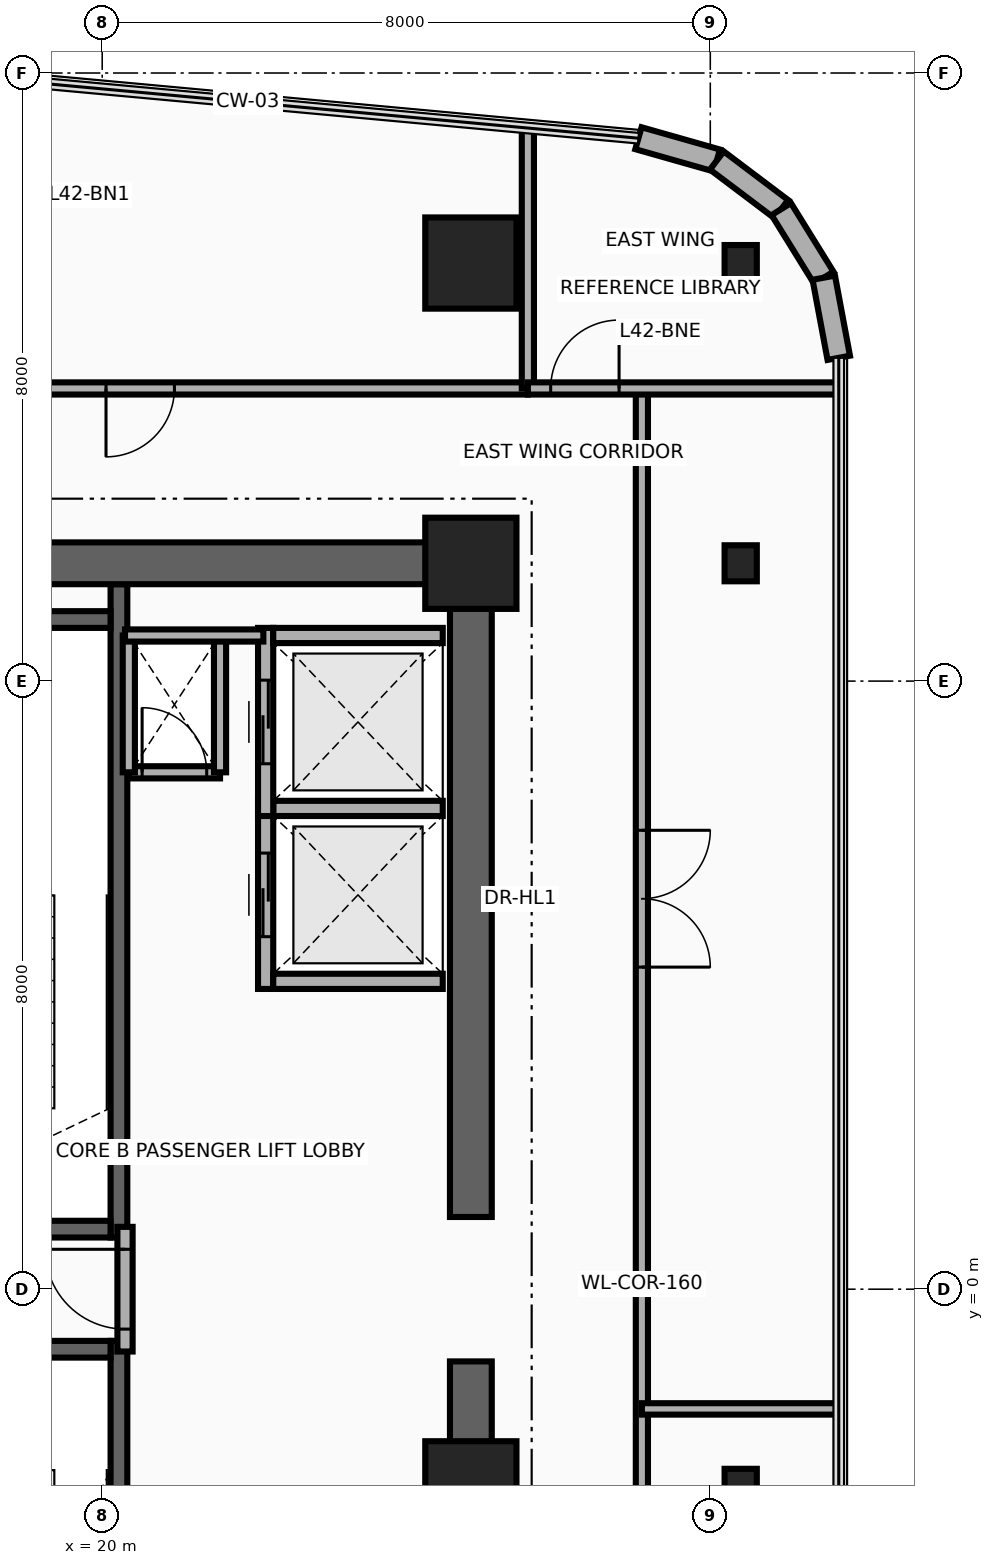
"""IFC4 building model, lengths in metres.
Left out: names, types, materials, properties, quantities, classifications, styles, units other than length and angle.
Written with IfcOpenShell. Run it as: python <this file> out.ifc"""

import sys

from ifc_helpers import new_model, si_unit, direction, frame, frame_2d, origin, origin_2d, place, context, subcontext, project, spatial, rectangle, i_section, extrude, source, transform, mapped, element, fill, save


model = new_model("IFC4")
c1 = context("Model", 3, precision=1e-05, world=origin(), true_north=direction((0.0, 1.0)))
c2 = subcontext(c1, "Body", "Model", "MODEL_VIEW")
j1 = project(units=[si_unit("LENGTHUNIT", "METRE"), si_unit("PLANEANGLEUNIT", "RADIAN")], contexts=[c1])
p1 = place(None, origin())
s1 = spatial("IfcSite", under=j1, at=p1, CompositionType="ELEMENT")
p2 = place(p1, origin())
s2 = spatial("IfcBuilding", under=s1, at=p2, CompositionType="ELEMENT")
p3 = place(p2, frame((0.0, 0.0, 164.9)))
s3 = spatial("IfcBuildingStorey", under=s2, at=p3, CompositionType="ELEMENT", Elevation=164.9)
p4 = place(p3, frame((20.22, 0.68, 0.0), z_axis=(0.0, 0.0, 1.0), x_axis=(0.0, 1.0, 0.0)))
e1 = element("IfcWall", 1, at=p4, inside=s3, PredefinedType="SHEAR", context=c2, shape_type="SweptSolid", body=[
    extrude(rectangle(XDim=8.595, YDim=0.22, at=frame_2d((4.297, 0.0))), origin(), (0.0, 0.0, 1.0), 3.46),
])
p5 = place(p3, frame((17.0, 0.79, 0.0), z_axis=(0.0, 0.0, 1.0), x_axis=(1.0, 0.0, 0.0)))
e2 = element("IfcWall", 2, at=p5, inside=s3, PredefinedType="SHEAR", context=c2, shape_type="SweptSolid", body=[
    extrude(rectangle(XDim=3.11, YDim=0.22, at=frame_2d((1.555, 0.0))), origin(), (0.0, 0.0, 1.0), 3.46),
])
p6 = place(p5, frame((0.95, 0.0, 0.0)))
e3 = element("IfcOpeningElement", 3, at=p6, cuts=e2, PredefinedType="OPENING", context=c2, shape_type="SweptSolid", body=[
    extrude(rectangle(XDim=1.1, YDim=2.15, at=frame_2d((0.55, 1.075))), frame((0.0, 0.125, 0.0), z_axis=(0.0, -1.0, 0.0), x_axis=(1.0, 0.0, 0.0)), (0.0, 0.0, 1.0), 0.25),
])
p7 = place(p3, frame((17.0, 8.81, 0.0), z_axis=(0.0, 0.0, 1.0), x_axis=(1.0, 0.0, 0.0)))
e4 = element("IfcWall", 4, at=p7, inside=s3, PredefinedType="SHEAR", context=c2, shape_type="SweptSolid", body=[
    extrude(rectangle(XDim=3.11, YDim=0.22, at=frame_2d((1.555, 0.0))), origin(), (0.0, 0.0, 1.0), 3.46),
])
p8 = place(p3, frame((20.22, -9.275, 0.0), z_axis=(0.0, 0.0, 1.0), x_axis=(0.0, 1.0, 0.0)))
e5 = element("IfcWall", 5, at=p8, inside=s3, PredefinedType="SHEAR", context=c2, shape_type="SweptSolid", body=[
    extrude(rectangle(XDim=8.595, YDim=0.22, at=frame_2d((4.297, 0.0))), origin(), (0.0, 0.0, 1.0), 3.46),
])
p9 = place(p3, frame((17.0, -0.79, 0.0), z_axis=(0.0, 0.0, 1.0), x_axis=(1.0, 0.0, 0.0)))
e6 = element("IfcWall", 6, at=p9, inside=s3, PredefinedType="SHEAR", context=c2, shape_type="SweptSolid", body=[
    extrude(rectangle(XDim=3.11, YDim=0.22, at=frame_2d((1.555, 0.0))), origin(), (0.0, 0.0, 1.0), 3.46),
])
p10 = place(p9, frame((0.95, 0.0, 0.0)))
e7 = element("IfcOpeningElement", 7, at=p10, cuts=e6, PredefinedType="OPENING", context=c2, shape_type="SweptSolid", body=[
    extrude(rectangle(XDim=1.1, YDim=2.15, at=frame_2d((0.55, 1.075))), frame((0.0, 0.125, 0.0), z_axis=(0.0, -1.0, 0.0), x_axis=(1.0, 0.0, 0.0)), (0.0, 0.0, 1.0), 0.25),
])
for number, where, z_axis, x_axis in (
    (8, (24.85, -9.825, 0.0), (0.0, 0.0, 1.0), (0.0, 1.0, 0.0)),
    (9, (24.85, 0.95, 0.0), (0.0, 0.0, 1.0), (0.0, 1.0, 0.0)),
):
    element("IfcWall", number, at=place(p3, frame(where, z_axis=z_axis, x_axis=x_axis)), inside=s3, PredefinedType="SHEAR", context=c2, shape_type="SweptSolid", body=[
        extrude(rectangle(XDim=8.875, YDim=0.55, at=frame_2d((4.438, 0.0))), origin(), (0.0, 0.0, 1.0), 3.46),
    ])
p11 = place(p3, frame((15.85, 9.55, 0.0), z_axis=(0.0, 0.0, 1.0), x_axis=(1.0, 0.0, 0.0)))
e10 = element("IfcWall", 10, at=p11, inside=s3, PredefinedType="SHEAR", context=c2, shape_type="SweptSolid", body=[
    extrude(rectangle(XDim=9.0, YDim=0.55, at=frame_2d((4.5, 0.0))), origin(), (0.0, 0.0, 1.0), 3.46),
])
m1 = source(origin(), c2, "Body", "SweptSolid", [
    extrude(rectangle(XDim=1.2, YDim=1.2, at=origin_2d()), origin(), (0.0, 0.0, 1.0), 3.7),
])
p12 = place(p3, frame((24.85, -2.6, 0.0), z_axis=(0.0, 0.0, 1.0), x_axis=(1.0, 0.0, 0.0)))
e11 = element("IfcColumn", 11, at=p12, inside=s3, PredefinedType="COLUMN", context=c2, shape_type="MappedRepresentation", body=[
    mapped(m1, transform((0.0, 0.0, 0.0), x_axis=(1.0, 0.0, 0.0), y_axis=(0.0, 1.0, 0.0), z_axis=(0.0, 0.0, 1.0), scale=1.0)),
])
m2 = source(origin(), c2, "Body", "SweptSolid", [
    extrude(i_section(OverallWidth=0.424, OverallDepth=0.474, WebThickness=0.048, FlangeThickness=0.077, at=origin_2d()), origin(), (0.0, 0.0, 1.0), 3.7),
])
p13 = place(p3, frame((28.4, -2.6, 0.0), z_axis=(0.0, 0.0, 1.0), x_axis=(1.0, 0.0, 0.0)))
e12 = element("IfcColumn", 12, at=p13, inside=s3, PredefinedType="COLUMN", context=c2, shape_type="MappedRepresentation", body=[
    mapped(m2, transform((0.0, 0.0, 0.0), x_axis=(1.0, 0.0, 0.0), y_axis=(0.0, 1.0, 0.0), z_axis=(0.0, 0.0, 1.0), scale=1.0)),
])
p14 = place(p3, frame((24.85, 9.55, 0.0), z_axis=(0.0, 0.0, 1.0), x_axis=(1.0, 0.0, 0.0)))
e13 = element("IfcColumn", 13, at=p14, inside=s3, PredefinedType="COLUMN", context=c2, shape_type="MappedRepresentation", body=[
    mapped(m1, transform((0.0, 0.0, 0.0), x_axis=(1.0, 0.0, 0.0), y_axis=(0.0, 1.0, 0.0), z_axis=(0.0, 0.0, 1.0), scale=1.0)),
])
p15 = place(p3, frame((28.4, 9.55, 0.0), z_axis=(0.0, 0.0, 1.0), x_axis=(1.0, 0.0, 0.0)))
e14 = element("IfcColumn", 14, at=p15, inside=s3, PredefinedType="COLUMN", context=c2, shape_type="MappedRepresentation", body=[
    mapped(m2, transform((0.0, 0.0, 0.0), x_axis=(1.0, 0.0, 0.0), y_axis=(0.0, 1.0, 0.0), z_axis=(0.0, 0.0, 1.0), scale=1.0)),
])
p16 = place(p3, frame((24.85, 13.5, 0.0), z_axis=(0.0, 0.0, 1.0), x_axis=(1.0, 0.0, 0.0)))
e15 = element("IfcColumn", 15, at=p16, inside=s3, PredefinedType="COLUMN", context=c2, shape_type="MappedRepresentation", body=[
    mapped(m1, transform((0.0, 0.0, 0.0), x_axis=(1.0, 0.0, 0.0), y_axis=(0.0, 1.0, 0.0), z_axis=(0.0, 0.0, 1.0), scale=1.0)),
])
p17 = place(p3, frame((28.4, 13.5, 0.0), z_axis=(0.0, 0.0, 1.0), x_axis=(1.0, 0.0, 0.0)))
e16 = element("IfcColumn", 16, at=p17, inside=s3, PredefinedType="COLUMN", context=c2, shape_type="MappedRepresentation", body=[
    mapped(m2, transform((0.0, 0.0, 0.0), x_axis=(1.0, 0.0, 0.0), y_axis=(0.0, 1.0, 0.0), z_axis=(0.0, 0.0, 1.0), scale=1.0)),
])
p18 = place(p3, frame((27.055, 15.142, 0.0), z_axis=(0.0, 0.0, 1.0), x_axis=(0.962012179147, -0.273006533206, 0.0)))
e17 = element("IfcWall", 17, at=p18, inside=s3, PredefinedType="SOLIDWALL", context=c2, shape_type="SweptSolid", body=[
    extrude(rectangle(XDim=1.072, YDim=0.3, at=frame_2d((0.536, 0.0))), origin(), (0.0, 0.0, 1.0), 3.46),
])
for number, where, z_axis, x_axis in (
    (18, (28.086, 14.849, 0.0), (0.0, 0.0, 1.0), (0.798, -0.602, 0.0)),
    (19, (28.934, 14.21, 0.0), (0.0, 0.0, 1.0), (0.527, -0.85, 0.0)),
):
    element("IfcWall", number, at=place(p3, frame(where, z_axis=z_axis, x_axis=x_axis)), inside=s3, PredefinedType="SOLIDWALL", context=c2, shape_type="SweptSolid", body=[
        extrude(rectangle(XDim=1.062, YDim=0.3, at=frame_2d((0.531, 0.0))), origin(), (0.0, 0.0, 1.0), 3.46),
    ])
p19 = place(p3, frame((29.493, 13.307, 0.0), z_axis=(0.0, 0.0, 1.0), x_axis=(0.183752343116, -0.98297257154, 0.0)))
e20 = element("IfcWall", 20, at=p19, inside=s3, PredefinedType="SOLIDWALL", context=c2, shape_type="SweptSolid", body=[
    extrude(rectangle(XDim=1.072, YDim=0.3, at=frame_2d((0.536, 0.0))), origin(), (0.0, 0.0, 1.0), 3.46),
])
p20 = place(p3, frame((22.15, 3.95, 0.0), z_axis=(0.0, 0.0, 1.0), x_axis=(0.0, 1.0, 0.0)))
e21 = element("IfcWall", 21, at=p20, inside=s3, PredefinedType="MOVABLE", context=c2, shape_type="SweptSolid", body=[
    extrude(rectangle(XDim=2.475, YDim=0.2, at=frame_2d((1.238, 0.0))), origin(), (0.0, 0.0, 1.0), 3.46),
])
p21 = place(p20, frame((0.688, 0.0, 0.0)))
e22 = element("IfcOpeningElement", 22, at=p21, cuts=e21, PredefinedType="OPENING", context=c2, shape_type="SweptSolid", body=[
    extrude(rectangle(XDim=1.1, YDim=2.1, at=frame_2d((0.55, 1.05))), frame((0.0, 0.115, 0.0), z_axis=(0.0, -1.0, 0.0), x_axis=(1.0, 0.0, 0.0)), (0.0, 0.0, 1.0), 0.23),
])
for number, where, z_axis, x_axis in (
    (23, (22.25, 4.05, 0.0), (0.0, 0.0, 1.0), (1.0, 0.0, 0.0)),
    (24, (22.25, 6.325, 0.0), (0.0, 0.0, 1.0), (1.0, 0.0, 0.0)),
):
    element("IfcWall", number, at=place(p3, frame(where, z_axis=z_axis, x_axis=x_axis)), inside=s3, PredefinedType="MOVABLE", context=c2, shape_type="SweptSolid", body=[
        extrude(rectangle(XDim=2.23, YDim=0.2, at=frame_2d((1.115, 0.0))), origin(), (0.0, 0.0, 1.0), 3.46),
    ])
p22 = place(p3, frame((22.15, 6.225, 0.0), z_axis=(0.0, 0.0, 1.0), x_axis=(0.0, 1.0, 0.0)))
e25 = element("IfcWall", 25, at=p22, inside=s3, PredefinedType="MOVABLE", context=c2, shape_type="SweptSolid", body=[
    extrude(rectangle(XDim=2.475, YDim=0.2, at=frame_2d((1.237, 0.0))), origin(), (0.0, 0.0, 1.0), 3.46),
])
p23 = place(p22, frame((0.688, 0.0, 0.0)))
e26 = element("IfcOpeningElement", 26, at=p23, cuts=e25, PredefinedType="OPENING", context=c2, shape_type="SweptSolid", body=[
    extrude(rectangle(XDim=1.1, YDim=2.1, at=frame_2d((0.55, 1.05))), frame((0.0, 0.115, 0.0), z_axis=(0.0, -1.0, 0.0), x_axis=(1.0, 0.0, 0.0)), (0.0, 0.0, 1.0), 0.23),
])
p24 = place(p3, frame((22.25, 8.6, 0.0), z_axis=(0.0, 0.0, 1.0), x_axis=(1.0, 0.0, 0.0)))
e27 = element("IfcWall", 27, at=p24, inside=s3, PredefinedType="MOVABLE", context=c2, shape_type="SweptSolid", body=[
    extrude(rectangle(XDim=2.23, YDim=0.2, at=frame_2d((1.115, 0.0))), origin(), (0.0, 0.0, 1.0), 3.46),
])
p25 = place(p3, frame((20.3, -0.82, 0.0), z_axis=(0.0, 0.0, 1.0), x_axis=(0.0, 1.0, 0.0)))
e28 = element("IfcWall", 28, at=p25, inside=s3, PredefinedType="PARTITIONING", context=c2, shape_type="SweptSolid", body=[
    extrude(rectangle(XDim=1.64, YDim=0.2, at=frame_2d((0.82, 0.0))), origin(), (0.0, 0.0, 1.0), 3.46),
])
p26 = place(p25, frame((0.295, 0.0, 0.0)))
e29 = element("IfcOpeningElement", 29, at=p26, cuts=e28, PredefinedType="OPENING", context=c2, shape_type="SweptSolid", body=[
    extrude(rectangle(XDim=1.05, YDim=2.15, at=frame_2d((0.525, 1.075))), frame((0.0, 0.115, 0.0), z_axis=(0.0, -1.0, 0.0), x_axis=(1.0, 0.0, 0.0)), (0.0, 0.0, 1.0), 0.23),
])
p27 = place(p3, frame((20.35, 6.8, 0.0), z_axis=(0.0, 0.0, 1.0), x_axis=(1.0, 0.0, 0.0)))
e30 = element("IfcWall", 30, at=p27, inside=s3, PredefinedType="PARTITIONING", context=c2, shape_type="SweptSolid", body=[
    extrude(rectangle(XDim=1.2, YDim=0.16, at=frame_2d((0.6, 0.0))), origin(), (0.0, 0.0, 1.0), 3.46),
])
p28 = place(p27, frame((0.175, 0.0, 0.0)))
e31 = element("IfcOpeningElement", 31, at=p28, cuts=e30, PredefinedType="OPENING", context=c2, shape_type="SweptSolid", body=[
    extrude(rectangle(XDim=0.85, YDim=2.05, at=frame_2d((0.425, 1.025))), frame((0.0, 0.095, 0.0), z_axis=(0.0, -1.0, 0.0), x_axis=(1.0, 0.0, 0.0)), (0.0, 0.0, 1.0), 0.19),
])
for number, where, z_axis, x_axis in (
    (32, (21.55, 6.8, 0.0), (0.0, 0.0, 1.0), (0.0, 1.0, 0.0)),
    (33, (20.35, 6.8, 0.0), (0.0, 0.0, 1.0), (0.0, 1.0, 0.0)),
):
    element("IfcWall", number, at=place(p3, frame(where, z_axis=z_axis, x_axis=x_axis)), inside=s3, PredefinedType="PARTITIONING", context=c2, shape_type="SweptSolid", body=[
        extrude(rectangle(XDim=1.8, YDim=0.16, at=frame_2d((0.9, 0.0))), origin(), (0.0, 0.0, 1.0), 3.46),
    ])
p29 = place(p3, frame((20.3, 8.6, 0.0), z_axis=(0.0, 0.0, 1.0), x_axis=(1.0, 0.0, 0.0)))
e34 = element("IfcWall", 34, at=p29, inside=s3, PredefinedType="PARTITIONING", context=c2, shape_type="SweptSolid", body=[
    extrude(rectangle(XDim=1.82, YDim=0.16, at=frame_2d((0.91, 0.0))), origin(), (0.0, 0.0, 1.0), 3.46),
])
p30 = place(p3, frame((15.4, 11.85, 0.0), z_axis=(0.0, 0.0, 1.0), x_axis=(1.0, 0.0, 0.0)))
e35 = element("IfcWall", 35, at=p30, inside=s3, PredefinedType="PARTITIONING", context=c2, shape_type="SweptSolid", body=[
    extrude(rectangle(XDim=10.2, YDim=0.16, at=frame_2d((5.1, 0.0))), origin(), (0.0, 0.0, 1.0), 2.834),
])
p31 = place(p30, frame((4.65, 0.0, 0.0)))
e36 = element("IfcOpeningElement", 36, at=p31, cuts=e35, PredefinedType="OPENING", context=c2, shape_type="SweptSolid", body=[
    extrude(rectangle(XDim=0.9, YDim=2.1, at=frame_2d((0.45, 1.05))), frame((0.0, 0.095, 0.0), z_axis=(0.0, -1.0, 0.0), x_axis=(1.0, 0.0, 0.0)), (0.0, 0.0, 1.0), 0.19),
])
p32 = place(p3, frame((25.6, 11.85, 0.0), z_axis=(0.0, 0.0, 1.0), x_axis=(0.0, 1.0, 0.0)))
e37 = element("IfcWall", 37, at=p32, inside=s3, PredefinedType="PARTITIONING", context=c2, shape_type="SweptSolid", body=[
    extrude(rectangle(XDim=3.426, YDim=0.16, at=frame_2d((1.713, 0.0))), origin(), (0.0, 0.0, 1.0), 2.666),
])
p33 = place(p3, frame((27.1, -11.701, 0.0), z_axis=(0.0, 0.0, 1.0), x_axis=(0.0, 1.0, 0.0)))
e38 = element("IfcWall", 38, at=p33, inside=s3, PredefinedType="PARTITIONING", context=c2, shape_type="SweptSolid", body=[
    extrude(rectangle(XDim=23.551, YDim=0.16, at=frame_2d((11.775, 0.0))), origin(), (0.0, 0.0, 1.0), 2.666),
])
p34 = place(p33, frame((4.163, 0.0, 0.0)))
e39 = element("IfcOpeningElement", 39, at=p34, cuts=e38, PredefinedType="OPENING", context=c2, shape_type="SweptSolid", body=[
    extrude(rectangle(XDim=1.8, YDim=2.15, at=frame_2d((0.9, 1.075))), frame((0.0, 0.095, 0.0), z_axis=(0.0, -1.0, 0.0), x_axis=(1.0, 0.0, 0.0)), (0.0, 0.0, 1.0), 0.19),
])
p35 = place(p33, frame((15.938, 0.0, 0.0)))
e40 = element("IfcOpeningElement", 40, at=p35, cuts=e38, PredefinedType="OPENING", context=c2, shape_type="SweptSolid", body=[
    extrude(rectangle(XDim=1.8, YDim=2.15, at=frame_2d((0.9, 1.075))), frame((0.0, 0.095, 0.0), z_axis=(0.0, -1.0, 0.0), x_axis=(1.0, 0.0, 0.0)), (0.0, 0.0, 1.0), 0.19),
])
p36 = place(p3, frame((25.6, 11.85, 0.0), z_axis=(0.0, 0.0, 1.0), x_axis=(1.0, 0.0, 0.0)))
e41 = element("IfcWall", 41, at=p36, inside=s3, PredefinedType="PARTITIONING", context=c2, shape_type="SweptSolid", body=[
    extrude(rectangle(XDim=4.09, YDim=0.16, at=frame_2d((2.045, 0.0))), origin(), (0.0, 0.0, 1.0), 2.896),
])
p37 = place(p36, frame((0.3, 0.0, 0.0)))
e42 = element("IfcOpeningElement", 42, at=p37, cuts=e41, PredefinedType="OPENING", context=c2, shape_type="SweptSolid", body=[
    extrude(rectangle(XDim=0.9, YDim=2.1, at=frame_2d((0.45, 1.05))), frame((0.0, 0.095, 0.0), z_axis=(0.0, -1.0, 0.0), x_axis=(1.0, 0.0, 0.0)), (0.0, 0.0, 1.0), 0.19),
])
p38 = place(p3, frame((27.1, -1.575, 0.0), z_axis=(0.0, 0.0, 1.0), x_axis=(1.0, 0.0, 0.0)))
e43 = element("IfcWall", 43, at=p38, inside=s3, PredefinedType="PARTITIONING", context=c2, shape_type="SweptSolid", body=[
    extrude(rectangle(XDim=2.59, YDim=0.15, at=frame_2d((1.295, 0.0))), origin(), (0.0, 0.0, 1.0), 2.896),
])
p39 = place(p21, origin())
e44 = element("IfcDoor", 44, at=p39, inside=s3, OperationType="DOUBLE_DOOR_SLIDING", PredefinedType="DOOR", context=c2, shape_type="SweptSolid", body=[
    extrude(rectangle(XDim=1.1, YDim=2.1, at=frame_2d((0.55, 1.05))), frame((0.0, 0.025, 0.0), z_axis=(0.0, -1.0, 0.0), x_axis=(1.0, 0.0, 0.0)), (0.0, 0.0, 1.0), 0.05),
])
fill(e22, e44)
p40 = place(p23, origin())
e45 = element("IfcDoor", 45, at=p40, inside=s3, OperationType="DOUBLE_DOOR_SLIDING", PredefinedType="DOOR", context=c2, shape_type="SweptSolid", body=[
    extrude(rectangle(XDim=1.1, YDim=2.1, at=frame_2d((0.55, 1.05))), frame((0.0, 0.025, 0.0), z_axis=(0.0, -1.0, 0.0), x_axis=(1.0, 0.0, 0.0)), (0.0, 0.0, 1.0), 0.05),
])
fill(e26, e45)
p41 = place(p26, origin())
e46 = element("IfcDoor", 46, at=p41, inside=s3, OperationType="SINGLE_SWING_RIGHT", PredefinedType="DOOR", context=c2, shape_type="SweptSolid", body=[
    extrude(rectangle(XDim=1.05, YDim=2.15, at=frame_2d((0.525, 1.075))), frame((0.0, 0.025, 0.0), z_axis=(0.0, -1.0, 0.0), x_axis=(1.0, 0.0, 0.0)), (0.0, 0.0, 1.0), 0.05),
])
fill(e29, e46)
p42 = place(p28, origin())
e47 = element("IfcDoor", 47, at=p42, inside=s3, OperationType="SINGLE_SWING_LEFT", PredefinedType="DOOR", context=c2, shape_type="SweptSolid", body=[
    extrude(rectangle(XDim=0.85, YDim=2.05, at=frame_2d((0.425, 1.025))), frame((0.0, 0.025, 0.0), z_axis=(0.0, -1.0, 0.0), x_axis=(1.0, 0.0, 0.0)), (0.0, 0.0, 1.0), 0.05),
])
fill(e31, e47)
p43 = place(p31, frame((0.9, 0.0, 0.0), z_axis=(0.0, 0.0, 1.0), x_axis=(-1.0, 0.0, 0.0)))
e48 = element("IfcDoor", 48, at=p43, inside=s3, OperationType="SINGLE_SWING_LEFT", PredefinedType="DOOR", context=c2, shape_type="SweptSolid", body=[
    extrude(rectangle(XDim=0.9, YDim=2.1, at=frame_2d((0.45, 1.05))), frame((0.0, 0.025, 0.0), z_axis=(0.0, -1.0, 0.0), x_axis=(1.0, 0.0, 0.0)), (0.0, 0.0, 1.0), 0.05),
])
fill(e36, e48)
p44 = place(p37, origin())
e49 = element("IfcDoor", 49, at=p44, inside=s3, OperationType="SINGLE_SWING_LEFT", PredefinedType="DOOR", context=c2, shape_type="SweptSolid", body=[
    extrude(rectangle(XDim=0.9, YDim=2.1, at=frame_2d((0.45, 1.05))), frame((0.0, 0.025, 0.0), z_axis=(0.0, -1.0, 0.0), x_axis=(1.0, 0.0, 0.0)), (0.0, 0.0, 1.0), 0.05),
])
fill(e42, e49)
p45 = place(p35, frame((1.8, 0.0, 0.0), z_axis=(0.0, 0.0, 1.0), x_axis=(-1.0, 0.0, 0.0)))
e50 = element("IfcDoor", 50, at=p45, inside=s3, OperationType="DOUBLE_DOOR_SINGLE_SWING", PredefinedType="DOOR", context=c2, shape_type="SweptSolid", body=[
    extrude(rectangle(XDim=1.8, YDim=2.15, at=frame_2d((0.9, 1.075))), frame((0.0, 0.025, 0.0), z_axis=(0.0, -1.0, 0.0), x_axis=(1.0, 0.0, 0.0)), (0.0, 0.0, 1.0), 0.05),
])
fill(e40, e50)
save(model, sys.argv[1])
